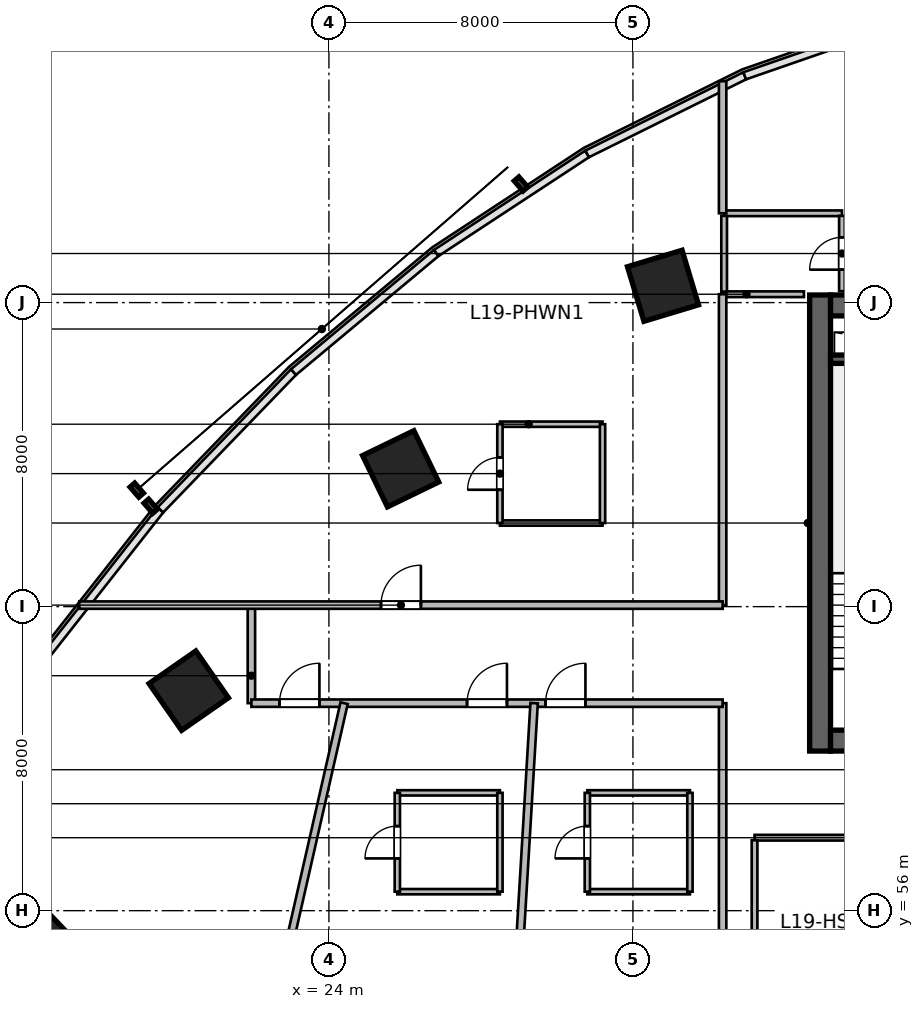
"""IFC4 building model, lengths in metres.
Left out: names, types, materials, properties, quantities, classifications, styles, units other than length and angle.
Written with IfcOpenShell. Run it as: python <this file> out.ifc"""

import sys

from ifc_helpers import new_model, si_unit, direction, frame, frame_2d, origin, origin_2d, place, context, subcontext, project, spatial, rectangle, extrude, source, transform, mapped, element, fill, save


model = new_model("IFC4")
c1 = context("Model", 3, precision=1e-05, world=origin(), true_north=direction((0.0, 1.0)))
c2 = subcontext(c1, "Body", "Model", "MODEL_VIEW")
j1 = project(units=[si_unit("LENGTHUNIT", "METRE"), si_unit("PLANEANGLEUNIT", "RADIAN")], contexts=[c1])
p1 = place(None, origin())
s1 = spatial("IfcSite", under=j1, at=p1, CompositionType="ELEMENT")
p2 = place(p1, origin())
s2 = spatial("IfcBuilding", under=s1, at=p2, CompositionType="ELEMENT")
p3 = place(p2, frame((0.0, 0.0, 82.2)))
s3 = spatial("IfcBuildingStorey", under=s2, at=p3, CompositionType="ELEMENT", Elevation=82.2)
m1 = source(origin(), c2, "Body", "SweptSolid", [
    extrude(rectangle(XDim=12.0, YDim=0.55, at=frame_2d((6.0, 0.0))), origin(), (0.0, 0.0, 1.0), 3.6),
])
p4 = place(p3, frame((36.925, 60.2, 0.0), z_axis=(0.0, 0.0, 1.0), x_axis=(0.0, 1.0, 0.0)))
e1 = element("IfcWall", 1, at=p4, inside=s3, PredefinedType="SHEAR", context=c2, shape_type="MappedRepresentation", body=[
    mapped(m1, transform((0.0, 0.0, 0.0), scale=1.0)),
])
m2 = source(origin(), c2, "Body", "SweptSolid", [
    extrude(rectangle(XDim=21.6, YDim=0.55, at=frame_2d((10.8, 0.0))), origin(), (0.0, 0.0, 1.0), 3.6),
])
p5 = place(p3, frame((37.2, 60.475, 0.0), z_axis=(0.0, 0.0, 1.0), x_axis=(1.0, 0.0, 0.0)))
e2 = element("IfcWall", 2, at=p5, inside=s3, PredefinedType="SHEAR", context=c2, shape_type="MappedRepresentation", body=[
    mapped(m2, transform((0.0, 0.0, 0.0), scale=1.0)),
])
p6 = place(p5, frame((1.1, 0.0, 0.0)))
e3 = element("IfcOpeningElement", 3, at=p6, cuts=e2, PredefinedType="OPENING", context=c2, shape_type="SweptSolid", body=[
    extrude(rectangle(XDim=1.15, YDim=2.15, at=frame_2d((0.575, 1.075))), frame((0.0, 0.285, 0.0), z_axis=(0.0, -1.0, 0.0), x_axis=(1.0, 0.0, 0.0)), (0.0, 0.0, 1.0), 0.57),
])
p7 = place(p5, frame((19.5, 0.0, 0.0)))
e4 = element("IfcOpeningElement", 4, at=p7, cuts=e2, PredefinedType="OPENING", context=c2, shape_type="SweptSolid", body=[
    extrude(rectangle(XDim=0.9, YDim=2.1, at=frame_2d((0.45, 1.05))), frame((0.0, 0.285, 0.0), z_axis=(0.0, -1.0, 0.0), x_axis=(1.0, 0.0, 0.0)), (0.0, 0.0, 1.0), 0.57),
])
p8 = place(p5, frame((12.02, 0.0, 0.0)))
e5 = element("IfcOpeningElement", 5, at=p8, cuts=e2, PredefinedType="OPENING", context=c2, shape_type="SweptSolid", body=[
    extrude(rectangle(XDim=1.6, YDim=2.15, at=frame_2d((0.8, 1.075))), frame((0.0, 0.285, 0.0), z_axis=(0.0, -1.0, 0.0), x_axis=(1.0, 0.0, 0.0)), (0.0, 0.0, 1.0), 0.57),
])
p9 = place(p3, frame((37.2, 71.925, 0.0), z_axis=(0.0, 0.0, 1.0), x_axis=(1.0, 0.0, 0.0)))
e6 = element("IfcWall", 6, at=p9, inside=s3, PredefinedType="SHEAR", context=c2, shape_type="MappedRepresentation", body=[
    mapped(m2, transform((0.0, 0.0, 0.0), scale=1.0)),
])
p10 = place(p9, frame((1.2, 0.0, 0.0)))
e7 = element("IfcOpeningElement", 7, at=p10, cuts=e6, PredefinedType="OPENING", context=c2, shape_type="SweptSolid", body=[
    extrude(rectangle(XDim=0.9, YDim=2.1, at=frame_2d((0.45, 1.05))), frame((0.0, 0.285, 0.0), z_axis=(0.0, -1.0, 0.0), x_axis=(1.0, 0.0, 0.0)), (0.0, 0.0, 1.0), 0.57),
])
p11 = place(p9, frame((14.7, 0.0, 0.0)))
e8 = element("IfcOpeningElement", 8, at=p11, cuts=e6, PredefinedType="OPENING", context=c2, shape_type="SweptSolid", body=[
    extrude(rectangle(XDim=1.2, YDim=2.15, at=frame_2d((0.6, 1.075))), frame((0.0, 0.285, 0.0), z_axis=(0.0, -1.0, 0.0), x_axis=(1.0, 0.0, 0.0)), (0.0, 0.0, 1.0), 0.57),
])
p12 = place(p9, frame((4.15, 0.0, 0.0)))
e9 = element("IfcOpeningElement", 9, at=p12, cuts=e6, PredefinedType="OPENING", context=c2, shape_type="SweptSolid", body=[
    extrude(rectangle(XDim=1.3, YDim=2.15, at=frame_2d((0.65, 1.075))), frame((0.0, 0.285, 0.0), z_axis=(0.0, -1.0, 0.0), x_axis=(1.0, 0.0, 0.0)), (0.0, 0.0, 1.0), 0.57),
])
p13 = place(p9, frame((6.76, 0.0, 0.0)))
e10 = element("IfcOpeningElement", 10, at=p13, cuts=e6, PredefinedType="OPENING", context=c2, shape_type="SweptSolid", body=[
    extrude(rectangle(XDim=0.85, YDim=2.1, at=frame_2d((0.425, 1.05))), frame((0.0, 0.285, 0.0), z_axis=(0.0, -1.0, 0.0), x_axis=(1.0, 0.0, 0.0)), (0.0, 0.0, 1.0), 0.57),
])
p14 = place(p9, frame((8.76, 0.0, 0.0)))
e11 = element("IfcOpeningElement", 11, at=p14, cuts=e6, PredefinedType="OPENING", context=c2, shape_type="SweptSolid", body=[
    extrude(rectangle(XDim=0.85, YDim=2.1, at=frame_2d((0.425, 1.05))), frame((0.0, 0.285, 0.0), z_axis=(0.0, -1.0, 0.0), x_axis=(1.0, 0.0, 0.0)), (0.0, 0.0, 1.0), 0.57),
])
p15 = place(p9, frame((10.725, 0.0, 0.0)))
e12 = element("IfcOpeningElement", 12, at=p15, cuts=e6, PredefinedType="OPENING", context=c2, shape_type="SweptSolid", body=[
    extrude(rectangle(XDim=0.85, YDim=2.1, at=frame_2d((0.425, 1.05))), frame((0.0, 0.285, 0.0), z_axis=(0.0, -1.0, 0.0), x_axis=(1.0, 0.0, 0.0)), (0.0, 0.0, 1.0), 0.57),
])
m3 = source(origin(), c2, "Body", "SweptSolid", [
    extrude(rectangle(XDim=3.27, YDim=0.22, at=frame_2d((1.635, 0.0))), origin(), (0.0, 0.0, 1.0), 3.6),
])
p16 = place(p3, frame((37.2, 70.51, 0.0), z_axis=(0.0, 0.0, 1.0), x_axis=(1.0, 0.0, 0.0)))
e13 = element("IfcWall", 13, at=p16, inside=s3, PredefinedType="SHEAR", context=c2, shape_type="MappedRepresentation", body=[
    mapped(m3, transform((0.0, 0.0, 0.0), scale=1.0)),
])
m4 = source(origin(), c2, "Body", "SweptSolid", [
    extrude(rectangle(XDim=1.5, YDim=1.5, at=origin_2d()), origin(), (0.0, 0.0, 1.0), 3.6),
])
for number, where, z_axis, x_axis in (
    (14, (16.007, 55.494, 0.0), (0.0, 0.0, 1.0), (-0.691, 0.723, 0.0)),
    (15, (20.311, 61.789, 0.0), (0.0, 0.0, 1.0), (-0.571, 0.821, 0.0)),
    (16, (25.888, 67.627, 0.0), (0.0, 0.0, 1.0), (-0.436, 0.9, 0.0)),
    (17, (32.791, 72.442, 0.0), (0.0, 0.0, 1.0), (-0.289, 0.957, 0.0)),
):
    element("IfcColumn", number, at=place(p3, frame(where, z_axis=z_axis, x_axis=x_axis)), inside=s3, PredefinedType="COLUMN", context=c2, shape_type="MappedRepresentation", body=[
        mapped(m4, transform((0.0, 0.0, 0.0), scale=1.0)),
    ])
m5 = source(origin(), c2, "Body", "SweptSolid", [
    extrude(rectangle(XDim=2.1, YDim=0.15, at=frame_2d((1.05, 0.0))), origin(), (0.0, 0.0, 1.0), 3.28),
])
p17 = place(p3, frame((34.4, 72.22, 0.0), z_axis=(0.0, 0.0, 1.0), x_axis=(1.0, 0.0, 0.0)))
e18 = element("IfcWall", 18, at=p17, inside=s3, PredefinedType="PARTITIONING", context=c2, shape_type="MappedRepresentation", body=[
    mapped(m5, transform((0.0, 0.0, 0.0), scale=1.0)),
])
m6 = source(origin(), c2, "Body", "SweptSolid", [
    extrude(rectangle(XDim=3.1, YDim=0.15, at=frame_2d((1.55, 0.0))), origin(), (0.0, 0.0, 1.0), 2.649),
])
p18 = place(p3, frame((34.4, 74.35, 0.0), z_axis=(0.0, 0.0, 1.0), x_axis=(1.0, 0.0, 0.0)))
e19 = element("IfcWall", 19, at=p18, inside=s3, PredefinedType="PARTITIONING", context=c2, shape_type="MappedRepresentation", body=[
    mapped(m6, transform((0.0, 0.0, 0.0), scale=1.0)),
])
m7 = source(origin(), c2, "Body", "SweptSolid", [
    extrude(rectangle(XDim=1.995, YDim=0.15, at=frame_2d((0.998, 0.0))), origin(), (0.0, 0.0, 1.0), 3.28),
])
p19 = place(p3, frame((34.4, 72.288, 0.0), z_axis=(0.0, 0.0, 1.0), x_axis=(0.0, 1.0, 0.0)))
e20 = element("IfcWall", 20, at=p19, inside=s3, PredefinedType="PARTITIONING", context=c2, shape_type="MappedRepresentation", body=[
    mapped(m7, transform((0.0, 0.0, 0.0), scale=1.0)),
])
m8 = source(origin(), c2, "Body", "SweptSolid", [
    extrude(rectangle(XDim=1.982, YDim=0.15, at=frame_2d((0.991, 0.0))), origin(), (0.0, 0.0, 1.0), 3.28),
])
p20 = place(p3, frame((37.5, 72.3, 0.0), z_axis=(0.0, 0.0, 1.0), x_axis=(0.0, 1.0, 0.0)))
e21 = element("IfcWall", 21, at=p20, inside=s3, PredefinedType="PARTITIONING", context=c2, shape_type="MappedRepresentation", body=[
    mapped(m8, transform((0.0, 0.0, 0.0), scale=1.0)),
])
p21 = place(p20, frame((0.566, 0.0, 0.0)))
e22 = element("IfcOpeningElement", 22, at=p21, cuts=e21, PredefinedType="OPENING", context=c2, shape_type="SweptSolid", body=[
    extrude(rectangle(XDim=0.85, YDim=2.1, at=frame_2d((0.425, 1.05))), frame((0.0, 0.085, 0.0), z_axis=(0.0, -1.0, 0.0), x_axis=(1.0, 0.0, 0.0)), (0.0, 0.0, 1.0), 0.17),
])
m9 = source(origin(), c2, "Body", "SweptSolid", [
    extrude(rectangle(XDim=2.58, YDim=0.195, at=frame_2d((1.29, 0.0))), origin(), (0.0, 0.0, 1.0), 3.28),
])
p22 = place(p3, frame((21.96, 61.46, 0.0), z_axis=(0.0, 0.0, 1.0), x_axis=(0.0, 1.0, 0.0)))
e23 = element("IfcWall", 23, at=p22, inside=s3, PredefinedType="PARTITIONING", context=c2, shape_type="MappedRepresentation", body=[
    mapped(m9, transform((0.0, 0.0, 0.0), scale=1.0)),
])
m10 = source(origin(), c2, "Body", "SweptSolid", [
    extrude(rectangle(XDim=6.6, YDim=0.15, at=frame_2d((3.3, 0.0))), origin(), (0.0, 0.0, 1.0), 3.28),
])
p23 = place(p3, frame((35.2, 57.92, 0.0), z_axis=(0.0, 0.0, 1.0), x_axis=(1.0, 0.0, 0.0)))
e24 = element("IfcWall", 24, at=p23, inside=s3, PredefinedType="PARTITIONING", context=c2, shape_type="MappedRepresentation", body=[
    mapped(m10, transform((0.0, 0.0, 0.0), scale=1.0)),
])
p24 = place(p23, frame((2.85, 0.0, 0.0)))
e25 = element("IfcOpeningElement", 25, at=p24, cuts=e24, PredefinedType="OPENING", context=c2, shape_type="SweptSolid", body=[
    extrude(rectangle(XDim=0.9, YDim=2.1, at=frame_2d((0.45, 1.05))), frame((0.0, 0.085, 0.0), z_axis=(0.0, -1.0, 0.0), x_axis=(1.0, 0.0, 0.0)), (0.0, 0.0, 1.0), 0.17),
])
m11 = source(origin(), c2, "Body", "SweptSolid", [
    extrude(rectangle(XDim=3.785, YDim=0.15, at=frame_2d((1.893, 0.0))), origin(), (0.0, 0.0, 1.0), 3.28),
])
p25 = place(p3, frame((35.2, 54.067, 0.0), z_axis=(0.0, 0.0, 1.0), x_axis=(0.0, 1.0, 0.0)))
e26 = element("IfcWall", 26, at=p25, inside=s3, PredefinedType="PARTITIONING", context=c2, shape_type="MappedRepresentation", body=[
    mapped(m11, transform((0.0, 0.0, 0.0), scale=1.0)),
])
m12 = source(origin(), c2, "Body", "SweptSolid", [
    extrude(rectangle(XDim=8.18, YDim=0.195, at=frame_2d((4.09, 0.0))), origin(), (0.0, 0.0, 1.0), 3.28),
])
p26 = place(p3, frame((34.36, 64.04, 0.0), z_axis=(0.0, 0.0, 1.0), x_axis=(0.0, 1.0, 0.0)))
e27 = element("IfcWall", 27, at=p26, inside=s3, PredefinedType="PARTITIONING", context=c2, shape_type="MappedRepresentation", body=[
    mapped(m12, transform((0.0, 0.0, 0.0), scale=1.0)),
])
m13 = source(origin(), c2, "Body", "SweptSolid", [
    extrude(rectangle(XDim=3.474, YDim=0.195, at=frame_2d((1.737, 0.0))), origin(), (0.0, 0.0, 1.0), 3.28),
])
p27 = place(p3, frame((34.36, 74.35, 0.0), z_axis=(0.0, 0.0, 1.0), x_axis=(0.0, 1.0, 0.0)))
e28 = element("IfcWall", 28, at=p27, inside=s3, PredefinedType="PARTITIONING", context=c2, shape_type="MappedRepresentation", body=[
    mapped(m13, transform((0.0, 0.0, 0.0), scale=1.0)),
])
m14 = source(origin(), c2, "Body", "SweptSolid", [
    extrude(rectangle(XDim=16.134, YDim=0.195, at=frame_2d((8.067, 0.0))), origin(), (0.0, 0.0, 1.0), 3.28),
])
p28 = place(p3, frame((34.36, 45.326, 0.0), z_axis=(0.0, 0.0, 1.0), x_axis=(0.0, 1.0, 0.0)))
e29 = element("IfcWall", 29, at=p28, inside=s3, PredefinedType="PARTITIONING", context=c2, shape_type="MappedRepresentation", body=[
    mapped(m14, transform((0.0, 0.0, 0.0), scale=1.0)),
])
m15 = source(origin(), c2, "Body", "SweptSolid", [
    extrude(rectangle(XDim=16.93, YDim=0.195, at=frame_2d((8.465, 0.0))), origin(), (0.0, 0.0, 1.0), 3.28),
])
p29 = place(p3, frame((17.43, 64.04, 0.0), z_axis=(0.0, 0.0, 1.0), x_axis=(1.0, 0.0, 0.0)))
e30 = element("IfcWall", 30, at=p29, inside=s3, PredefinedType="PARTITIONING", context=c2, shape_type="MappedRepresentation", body=[
    mapped(m15, transform((0.0, 0.0, 0.0), scale=1.0)),
])
p30 = place(p29, frame((7.94, 0.0, 0.0)))
e31 = element("IfcOpeningElement", 31, at=p30, cuts=e30, PredefinedType="OPENING", context=c2, shape_type="SweptSolid", body=[
    extrude(rectangle(XDim=1.05, YDim=2.15, at=frame_2d((0.525, 1.075))), frame((0.0, 0.107, 0.0), z_axis=(0.0, -1.0, 0.0), x_axis=(1.0, 0.0, 0.0)), (0.0, 0.0, 1.0), 0.215),
])
m16 = source(origin(), c2, "Body", "SweptSolid", [
    extrude(rectangle(XDim=12.4, YDim=0.195, at=frame_2d((6.2, 0.0))), origin(), (0.0, 0.0, 1.0), 3.28),
])
p31 = place(p3, frame((21.96, 61.46, 0.0), z_axis=(0.0, 0.0, 1.0), x_axis=(1.0, 0.0, 0.0)))
e32 = element("IfcWall", 32, at=p31, inside=s3, PredefinedType="PARTITIONING", context=c2, shape_type="MappedRepresentation", body=[
    mapped(m16, transform((0.0, 0.0, 0.0), scale=1.0)),
])
p32 = place(p31, frame((0.74, 0.0, 0.0)))
e33 = element("IfcOpeningElement", 33, at=p32, cuts=e32, PredefinedType="OPENING", context=c2, shape_type="SweptSolid", body=[
    extrude(rectangle(XDim=1.05, YDim=2.15, at=frame_2d((0.525, 1.075))), frame((0.0, 0.107, 0.0), z_axis=(0.0, -1.0, 0.0), x_axis=(1.0, 0.0, 0.0)), (0.0, 0.0, 1.0), 0.215),
])
p33 = place(p31, frame((5.675, 0.0, 0.0)))
e34 = element("IfcOpeningElement", 34, at=p33, cuts=e32, PredefinedType="OPENING", context=c2, shape_type="SweptSolid", body=[
    extrude(rectangle(XDim=1.05, YDim=2.15, at=frame_2d((0.525, 1.075))), frame((0.0, 0.107, 0.0), z_axis=(0.0, -1.0, 0.0), x_axis=(1.0, 0.0, 0.0)), (0.0, 0.0, 1.0), 0.215),
])
p34 = place(p31, frame((7.74, 0.0, 0.0)))
e35 = element("IfcOpeningElement", 35, at=p34, cuts=e32, PredefinedType="OPENING", context=c2, shape_type="SweptSolid", body=[
    extrude(rectangle(XDim=1.05, YDim=2.15, at=frame_2d((0.525, 1.075))), frame((0.0, 0.107, 0.0), z_axis=(0.0, -1.0, 0.0), x_axis=(1.0, 0.0, 0.0)), (0.0, 0.0, 1.0), 0.215),
])
m17 = source(origin(), c2, "Body", "SweptSolid", [
    extrude(rectangle(XDim=26.476, YDim=0.195, at=frame_2d((13.238, 0.0))), origin(), (0.0, 0.0, 1.0), 2.847),
])
p35 = place(p3, frame((18.52, 35.646, 0.0), z_axis=(0.0, 0.0, 1.0), x_axis=(0.22210613157, 0.975022495289, 0.0)))
e36 = element("IfcWall", 36, at=p35, inside=s3, PredefinedType="PARTITIONING", context=c2, shape_type="MappedRepresentation", body=[
    mapped(m17, transform((0.0, 0.0, 0.0), scale=1.0)),
])
m18 = source(origin(), c2, "Body", "SweptSolid", [
    extrude(rectangle(XDim=24.889, YDim=0.195, at=frame_2d((12.444, 0.0))), origin(), (0.0, 0.0, 1.0), 2.564),
])
p36 = place(p3, frame((27.914, 36.616, 0.0), z_axis=(0.0, 0.0, 1.0), x_axis=(0.059709317989, 0.998215807, 0.0)))
e37 = element("IfcWall", 37, at=p36, inside=s3, PredefinedType="PARTITIONING", context=c2, shape_type="MappedRepresentation", body=[
    mapped(m18, transform((0.0, 0.0, 0.0), scale=1.0)),
])
m19 = source(origin(), c2, "Body", "SweptSolid", [
    extrude(rectangle(XDim=2.7, YDim=0.14, at=frame_2d((1.35, 0.0))), origin(), (0.0, 0.0, 1.0), 3.28),
])
for number, where, z_axis, x_axis in (
    (38, (28.5, 68.8, 0.0), (0.0, 0.0, 1.0), (1.0, 0.0, 0.0)),
    (39, (28.5, 66.2, 0.0), (0.0, 0.0, 1.0), (1.0, 0.0, 0.0)),
):
    element("IfcWall", number, at=place(p3, frame(where, z_axis=z_axis, x_axis=x_axis)), inside=s3, PredefinedType="PARTITIONING", context=c2, shape_type="MappedRepresentation", body=[
        mapped(m19, transform((0.0, 0.0, 0.0), scale=1.0)),
    ])
m20 = source(origin(), c2, "Body", "SweptSolid", [
    extrude(rectangle(XDim=2.6, YDim=0.14, at=frame_2d((1.3, 0.0))), origin(), (0.0, 0.0, 1.0), 3.28),
])
p37 = place(p3, frame((28.5, 66.2, 0.0), z_axis=(0.0, 0.0, 1.0), x_axis=(0.0, 1.0, 0.0)))
e40 = element("IfcWall", 40, at=p37, inside=s3, PredefinedType="PARTITIONING", context=c2, shape_type="MappedRepresentation", body=[
    mapped(m20, transform((0.0, 0.0, 0.0), scale=1.0)),
])
p38 = place(p37, frame((0.875, 0.0, 0.0)))
e41 = element("IfcOpeningElement", 41, at=p38, cuts=e40, PredefinedType="OPENING", context=c2, shape_type="SweptSolid", body=[
    extrude(rectangle(XDim=0.85, YDim=2.05, at=frame_2d((0.425, 1.025))), frame((0.0, 0.08, 0.0), z_axis=(0.0, -1.0, 0.0), x_axis=(1.0, 0.0, 0.0)), (0.0, 0.0, 1.0), 0.16),
])
p39 = place(p3, frame((31.2, 66.2, 0.0), z_axis=(0.0, 0.0, 1.0), x_axis=(0.0, 1.0, 0.0)))
e42 = element("IfcWall", 42, at=p39, inside=s3, PredefinedType="PARTITIONING", context=c2, shape_type="MappedRepresentation", body=[
    mapped(m20, transform((0.0, 0.0, 0.0), scale=1.0)),
])
for number, where, z_axis, x_axis in (
    (43, (25.8, 59.1, 0.0), (0.0, 0.0, 1.0), (1.0, 0.0, 0.0)),
    (44, (25.8, 56.5, 0.0), (0.0, 0.0, 1.0), (1.0, 0.0, 0.0)),
):
    element("IfcWall", number, at=place(p3, frame(where, z_axis=z_axis, x_axis=x_axis)), inside=s3, PredefinedType="PARTITIONING", context=c2, shape_type="MappedRepresentation", body=[
        mapped(m19, transform((0.0, 0.0, 0.0), scale=1.0)),
    ])
p40 = place(p3, frame((25.8, 56.5, 0.0), z_axis=(0.0, 0.0, 1.0), x_axis=(0.0, 1.0, 0.0)))
e45 = element("IfcWall", 45, at=p40, inside=s3, PredefinedType="PARTITIONING", context=c2, shape_type="MappedRepresentation", body=[
    mapped(m20, transform((0.0, 0.0, 0.0), scale=1.0)),
])
p41 = place(p40, frame((0.875, 0.0, 0.0)))
e46 = element("IfcOpeningElement", 46, at=p41, cuts=e45, PredefinedType="OPENING", context=c2, shape_type="SweptSolid", body=[
    extrude(rectangle(XDim=0.85, YDim=2.05, at=frame_2d((0.425, 1.025))), frame((0.0, 0.08, 0.0), z_axis=(0.0, -1.0, 0.0), x_axis=(1.0, 0.0, 0.0)), (0.0, 0.0, 1.0), 0.16),
])
m21 = source(origin(), c2, "Body", "SweptSolid", [
    extrude(rectangle(XDim=2.6, YDim=0.14, at=frame_2d((1.3, 0.0))), origin(), (0.0, 0.0, 1.0), 2.847),
])
p42 = place(p3, frame((28.5, 56.5, 0.0), z_axis=(0.0, 0.0, 1.0), x_axis=(0.0, 1.0, 0.0)))
e47 = element("IfcWall", 47, at=p42, inside=s3, PredefinedType="PARTITIONING", context=c2, shape_type="MappedRepresentation", body=[
    mapped(m21, transform((0.0, 0.0, 0.0), scale=1.0)),
])
for number, where, z_axis, x_axis in (
    (48, (30.8, 59.1, 0.0), (0.0, 0.0, 1.0), (1.0, 0.0, 0.0)),
    (49, (30.8, 56.5, 0.0), (0.0, 0.0, 1.0), (1.0, 0.0, 0.0)),
):
    element("IfcWall", number, at=place(p3, frame(where, z_axis=z_axis, x_axis=x_axis)), inside=s3, PredefinedType="PARTITIONING", context=c2, shape_type="MappedRepresentation", body=[
        mapped(m19, transform((0.0, 0.0, 0.0), scale=1.0)),
    ])
m22 = source(origin(), c2, "Body", "SweptSolid", [
    extrude(rectangle(XDim=2.6, YDim=0.14, at=frame_2d((1.3, 0.0))), origin(), (0.0, 0.0, 1.0), 2.564),
])
p43 = place(p3, frame((30.8, 56.5, 0.0), z_axis=(0.0, 0.0, 1.0), x_axis=(0.0, 1.0, 0.0)))
e50 = element("IfcWall", 50, at=p43, inside=s3, PredefinedType="PARTITIONING", context=c2, shape_type="MappedRepresentation", body=[
    mapped(m22, transform((0.0, 0.0, 0.0), scale=1.0)),
])
p44 = place(p43, frame((0.875, 0.0, 0.0)))
e51 = element("IfcOpeningElement", 51, at=p44, cuts=e50, PredefinedType="OPENING", context=c2, shape_type="SweptSolid", body=[
    extrude(rectangle(XDim=0.85, YDim=2.05, at=frame_2d((0.425, 1.025))), frame((0.0, 0.08, 0.0), z_axis=(0.0, -1.0, 0.0), x_axis=(1.0, 0.0, 0.0)), (0.0, 0.0, 1.0), 0.16),
])
p45 = place(p3, frame((33.5, 56.5, 0.0), z_axis=(0.0, 0.0, 1.0), x_axis=(0.0, 1.0, 0.0)))
e52 = element("IfcWall", 52, at=p45, inside=s3, PredefinedType="PARTITIONING", context=c2, shape_type="MappedRepresentation", body=[
    mapped(m20, transform((0.0, 0.0, 0.0), scale=1.0)),
])
m23 = source(origin(), c2, "Body", "SweptSolid", [
    extrude(rectangle(XDim=0.85, YDim=2.1, at=frame_2d((0.425, 1.05))), frame((0.0, 0.025, 0.0), z_axis=(0.0, -1.0, 0.0), x_axis=(1.0, 0.0, 0.0)), (0.0, 0.0, 1.0), 0.05),
])
p46 = place(p21, origin())
e53 = element("IfcDoor", 53, at=p46, inside=s3, OperationType="SINGLE_SWING_LEFT", PredefinedType="DOOR", context=c2, shape_type="MappedRepresentation", body=[
    mapped(m23, transform((0.0, 0.0, 0.0), scale=1.0)),
])
fill(e22, e53)
m24 = source(origin(), c2, "Body", "SweptSolid", [
    extrude(rectangle(XDim=1.05, YDim=2.15, at=frame_2d((0.525, 1.075))), frame((0.0, 0.025, 0.0), z_axis=(0.0, -1.0, 0.0), x_axis=(1.0, 0.0, 0.0)), (0.0, 0.0, 1.0), 0.05),
])
p47 = place(p30, origin())
e54 = element("IfcDoor", 54, at=p47, inside=s3, OperationType="SINGLE_SWING_RIGHT", PredefinedType="DOOR", context=c2, shape_type="MappedRepresentation", body=[
    mapped(m24, transform((0.0, 0.0, 0.0), scale=1.0)),
])
fill(e31, e54)
m25 = source(origin(), c2, "Body", "SweptSolid", [
    extrude(rectangle(XDim=0.85, YDim=2.05, at=frame_2d((0.425, 1.025))), frame((0.0, 0.025, 0.0), z_axis=(0.0, -1.0, 0.0), x_axis=(1.0, 0.0, 0.0)), (0.0, 0.0, 1.0), 0.05),
])
p48 = place(p38, origin())
e55 = element("IfcDoor", 55, at=p48, inside=s3, OperationType="SINGLE_SWING_LEFT", PredefinedType="DOOR", context=c2, shape_type="MappedRepresentation", body=[
    mapped(m25, transform((0.0, 0.0, 0.0), scale=1.0)),
])
fill(e41, e55)
p49 = place(p32, origin())
e56 = element("IfcDoor", 56, at=p49, inside=s3, OperationType="SINGLE_SWING_RIGHT", PredefinedType="DOOR", context=c2, shape_type="MappedRepresentation", body=[
    mapped(m24, transform((0.0, 0.0, 0.0), scale=1.0)),
])
fill(e33, e56)
p50 = place(p33, origin())
e57 = element("IfcDoor", 57, at=p50, inside=s3, OperationType="SINGLE_SWING_RIGHT", PredefinedType="DOOR", context=c2, shape_type="MappedRepresentation", body=[
    mapped(m24, transform((0.0, 0.0, 0.0), scale=1.0)),
])
fill(e34, e57)
p51 = place(p41, origin())
e58 = element("IfcDoor", 58, at=p51, inside=s3, OperationType="SINGLE_SWING_LEFT", PredefinedType="DOOR", context=c2, shape_type="MappedRepresentation", body=[
    mapped(m25, transform((0.0, 0.0, 0.0), scale=1.0)),
])
fill(e46, e58)
p52 = place(p34, origin())
e59 = element("IfcDoor", 59, at=p52, inside=s3, OperationType="SINGLE_SWING_RIGHT", PredefinedType="DOOR", context=c2, shape_type="MappedRepresentation", body=[
    mapped(m24, transform((0.0, 0.0, 0.0), scale=1.0)),
])
fill(e35, e59)
p53 = place(p44, origin())
e60 = element("IfcDoor", 60, at=p53, inside=s3, OperationType="SINGLE_SWING_LEFT", PredefinedType="DOOR", context=c2, shape_type="MappedRepresentation", body=[
    mapped(m25, transform((0.0, 0.0, 0.0), scale=1.0)),
])
fill(e51, e60)
save(model, sys.argv[1])
